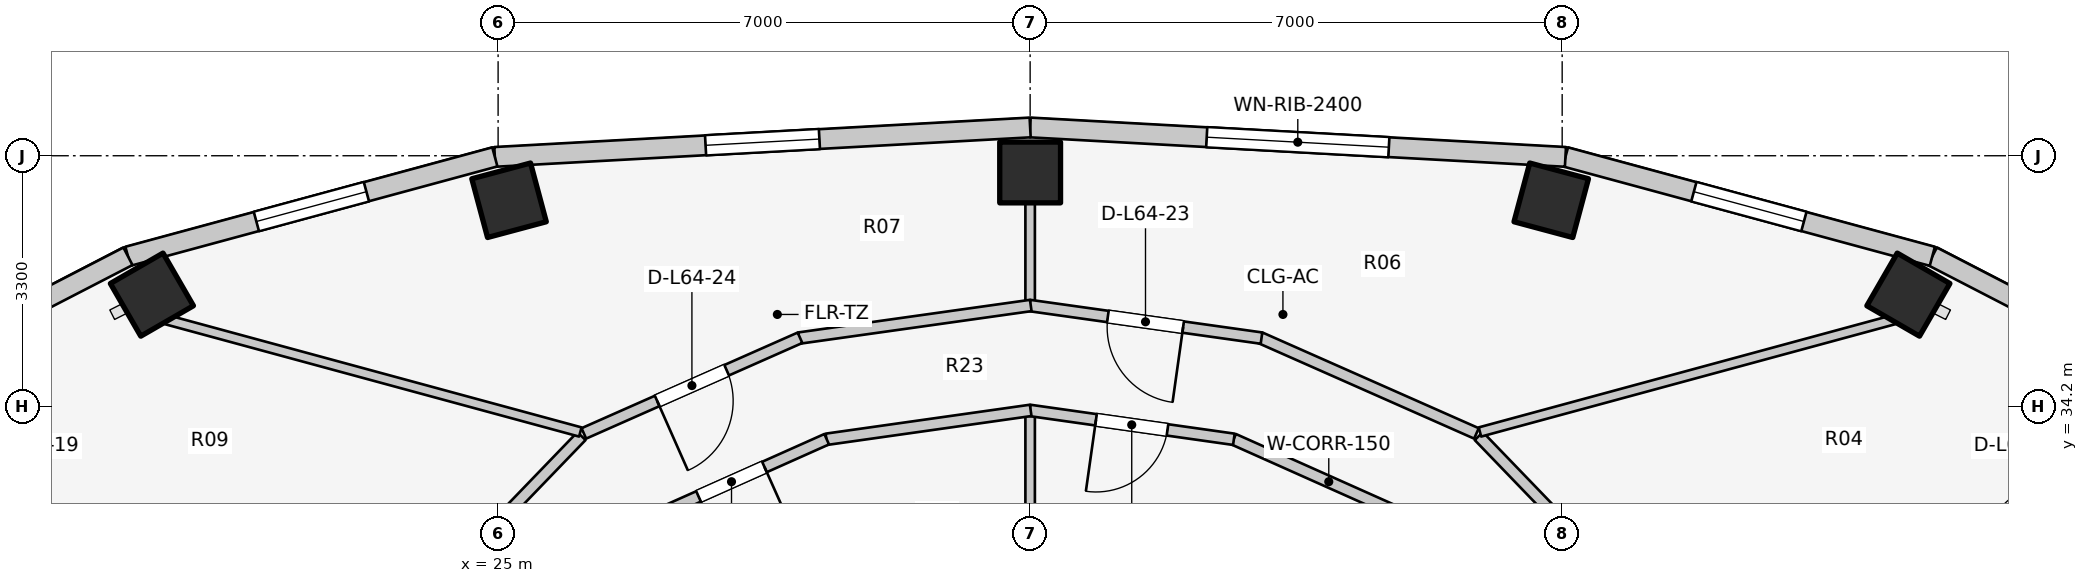
"""IFC4 building model, lengths in metres.
Left out: names, types, materials, properties, quantities, classifications, styles, units other than length and angle.
Written with IfcOpenShell. Run it as: python <this file> out.ifc"""

import sys

from ifc_helpers import new_model, si_unit, direction, frame, frame_2d, origin, origin_2d, place, context, subcontext, project, spatial, rectangle, extrude, element, fill, save


model = new_model("IFC4")
c1 = context("Model", 3, precision=1e-05, world=origin(), true_north=direction((0.0, 1.0)))
c2 = subcontext(c1, "Body", "Model", "MODEL_VIEW")
j1 = project(units=[si_unit("LENGTHUNIT", "METRE"), si_unit("PLANEANGLEUNIT", "RADIAN")], contexts=[c1])
p1 = place(None, origin())
s1 = spatial("IfcSite", under=j1, at=p1, CompositionType="ELEMENT")
p2 = place(p1, origin())
s2 = spatial("IfcBuilding", under=s1, at=p2, CompositionType="ELEMENT")
p3 = place(p2, frame((0.0, 0.0, 210.9)))
s3 = spatial("IfcBuildingStorey", under=s2, at=p3, CompositionType="ELEMENT", Elevation=210.9)
for number, where, z_axis, x_axis in (
    (1, (43.555, 35.673, 0.0), (0.0, 0.0, 1.0), (0.5, 0.866, 0.0)),
    (2, (38.856, 36.914, 0.0), (0.0, 0.0, 1.0), (0.259, 0.966, 0.0)),
    (3, (32.0, 37.28, 0.0), (0.0, 0.0, 1.0), (0.0, 1.0, 0.0)),
    (4, (25.144, 36.914, 0.0), (0.0, 0.0, 1.0), (-0.259, 0.966, 0.0)),
    (5, (20.445, 35.673, 0.0), (0.0, 0.0, 1.0), (-0.5, 0.866, 0.0)),
):
    element("IfcColumn", number, at=place(p3, frame(where, z_axis=z_axis, x_axis=x_axis)), inside=s3, PredefinedType="COLUMN", context=c2, shape_type="SweptSolid", body=[
        extrude(rectangle(XDim=0.8, YDim=0.8, at=origin_2d()), origin(), (0.0, 0.0, 1.0), 3.1),
    ])
p4 = place(p3, frame((47.558, 34.272, 0.0), z_axis=(0.0, 0.0, 1.0), x_axis=(-0.88849146803, 0.458893137057, 0.0)))
e6 = element("IfcWall", 6, at=p4, inside=s3, PredefinedType="STANDARD", context=c2, shape_type="SweptSolid", body=[
    extrude(rectangle(XDim=4.15, YDim=0.26, at=frame_2d((2.075, 0.0))), origin(), (0.0, 0.0, 1.0), 2.85),
])
p5 = place(p3, frame((43.87, 36.177, 0.0), z_axis=(0.0, 0.0, 1.0), x_axis=(-0.965213026382, 0.261464746576, 0.0)))
e7 = element("IfcWall", 7, at=p5, inside=s3, PredefinedType="STANDARD", context=c2, shape_type="SweptSolid", body=[
    extrude(rectangle(XDim=5.001, YDim=0.26, at=frame_2d((2.5, 0.0))), origin(), (0.0, 0.0, 1.0), 2.85),
])
p6 = place(p5, frame((1.75, 0.0, 0.75)))
e8 = element("IfcOpeningElement", 8, at=p6, cuts=e7, PredefinedType="OPENING", context=c2, shape_type="SweptSolid", body=[
    extrude(rectangle(XDim=1.5, YDim=1.6, at=frame_2d((0.75, 0.8))), frame((0.0, 0.14, 0.0), z_axis=(0.0, -1.0, 0.0), x_axis=(1.0, 0.0, 0.0)), (0.0, 0.0, 1.0), 0.28),
])
p7 = place(p3, frame((39.043, 37.485, 0.0), z_axis=(0.0, 0.0, 1.0), x_axis=(-0.998490239527, 0.054929423535, 0.0)))
e9 = element("IfcWall", 9, at=p7, inside=s3, PredefinedType="STANDARD", context=c2, shape_type="SweptSolid", body=[
    extrude(rectangle(XDim=7.054, YDim=0.26, at=frame_2d((3.527, 0.0))), origin(), (0.0, 0.0, 1.0), 2.85),
])
p8 = place(p7, frame((2.327, 0.0, 0.75)))
e10 = element("IfcOpeningElement", 10, at=p8, cuts=e9, PredefinedType="OPENING", context=c2, shape_type="SweptSolid", body=[
    extrude(rectangle(XDim=2.4, YDim=1.7, at=frame_2d((1.2, 0.85))), frame((0.0, 0.14, 0.0), z_axis=(0.0, -1.0, 0.0), x_axis=(1.0, 0.0, 0.0)), (0.0, 0.0, 1.0), 0.28),
])
p9 = place(p3, frame((32.0, 37.872, 0.0), z_axis=(0.0, 0.0, 1.0), x_axis=(-0.998490239527, -0.054929423535, 0.0)))
e11 = element("IfcWall", 11, at=p9, inside=s3, PredefinedType="STANDARD", context=c2, shape_type="SweptSolid", body=[
    extrude(rectangle(XDim=7.054, YDim=0.26, at=frame_2d((3.527, 0.0))), origin(), (0.0, 0.0, 1.0), 2.85),
])
p10 = place(p9, frame((2.777, 0.0, 0.75)))
e12 = element("IfcOpeningElement", 12, at=p10, cuts=e11, PredefinedType="OPENING", context=c2, shape_type="SweptSolid", body=[
    extrude(rectangle(XDim=1.5, YDim=1.6, at=frame_2d((0.75, 0.8))), frame((0.0, 0.14, 0.0), z_axis=(0.0, -1.0, 0.0), x_axis=(1.0, 0.0, 0.0)), (0.0, 0.0, 1.0), 0.28),
])
p11 = place(p3, frame((24.957, 37.485, 0.0), z_axis=(0.0, 0.0, 1.0), x_axis=(-0.965213026382, -0.261464746576, 0.0)))
e13 = element("IfcWall", 13, at=p11, inside=s3, PredefinedType="STANDARD", context=c2, shape_type="SweptSolid", body=[
    extrude(rectangle(XDim=5.001, YDim=0.26, at=frame_2d((2.5, 0.0))), origin(), (0.0, 0.0, 1.0), 2.85),
])
p12 = place(p11, frame((1.75, 0.0, 0.75)))
e14 = element("IfcOpeningElement", 14, at=p12, cuts=e13, PredefinedType="OPENING", context=c2, shape_type="SweptSolid", body=[
    extrude(rectangle(XDim=1.5, YDim=1.6, at=frame_2d((0.75, 0.8))), frame((0.0, 0.14, 0.0), z_axis=(0.0, -1.0, 0.0), x_axis=(1.0, 0.0, 0.0)), (0.0, 0.0, 1.0), 0.28),
])
p13 = place(p3, frame((20.13, 36.177, 0.0), z_axis=(0.0, 0.0, 1.0), x_axis=(-0.88849146803, -0.458893137057, 0.0)))
e15 = element("IfcWall", 15, at=p13, inside=s3, PredefinedType="STANDARD", context=c2, shape_type="SweptSolid", body=[
    extrude(rectangle(XDim=4.15, YDim=0.26, at=frame_2d((2.075, 0.0))), origin(), (0.0, 0.0, 1.0), 2.85),
])
p14 = place(p3, frame((32.0, 31.1, 0.0), z_axis=(0.0, 0.0, 1.0), x_axis=(0.0, 1.0, 0.0)))
e16 = element("IfcWall", 16, at=p14, inside=s3, PredefinedType="PARTITIONING", context=c2, shape_type="SweptSolid", body=[
    extrude(rectangle(XDim=3.05, YDim=0.125, at=frame_2d((1.525, 0.0))), origin(), (0.0, 0.0, 1.0), 2.376),
])
p15 = place(p3, frame((37.181, 32.652, 0.0), z_axis=(0.0, 0.0, 1.0), x_axis=(-0.913120130558, 0.407690602257, 0.0)))
e17 = element("IfcWall", 17, at=p15, inside=s3, PredefinedType="PARTITIONING", context=c2, shape_type="SweptSolid", body=[
    extrude(rectangle(XDim=2.743, YDim=0.15, at=frame_2d((1.371, 0.0))), origin(), (0.0, 0.0, 1.0), 2.376),
])
p16 = place(p3, frame((34.68, 33.77, 0.0), z_axis=(0.0, 0.0, 1.0), x_axis=(-0.990132151456, 0.140136799779, 0.0)))
e18 = element("IfcWall", 18, at=p16, inside=s3, PredefinedType="PARTITIONING", context=c2, shape_type="SweptSolid", body=[
    extrude(rectangle(XDim=2.714, YDim=0.15, at=frame_2d((1.357, 0.0))), origin(), (0.0, 0.0, 1.0), 2.376),
])
p17 = place(p16, frame((0.882, 0.0, 0.0)))
e19 = element("IfcOpeningElement", 19, at=p17, cuts=e18, PredefinedType="OPENING", context=c2, shape_type="SweptSolid", body=[
    extrude(rectangle(XDim=0.95, YDim=2.1, at=frame_2d((0.475, 1.05))), frame((0.0, 0.085, 0.0), z_axis=(0.0, -1.0, 0.0), x_axis=(1.0, 0.0, 0.0)), (0.0, 0.0, 1.0), 0.17),
])
p18 = place(p3, frame((32.007, 34.15, 0.0), z_axis=(0.0, 0.0, 1.0), x_axis=(-0.990132151456, -0.140136799779, 0.0)))
e20 = element("IfcWall", 20, at=p18, inside=s3, PredefinedType="PARTITIONING", context=c2, shape_type="SweptSolid", body=[
    extrude(rectangle(XDim=2.714, YDim=0.15, at=frame_2d((1.357, 0.0))), origin(), (0.0, 0.0, 1.0), 2.376),
])
p19 = place(p3, frame((29.323, 33.771, 0.0), z_axis=(0.0, 0.0, 1.0), x_axis=(-0.913120130558, -0.407690602257, 0.0)))
e21 = element("IfcWall", 21, at=p19, inside=s3, PredefinedType="PARTITIONING", context=c2, shape_type="SweptSolid", body=[
    extrude(rectangle(XDim=2.743, YDim=0.15, at=frame_2d((1.371, 0.0))), origin(), (0.0, 0.0, 1.0), 2.376),
])
p20 = place(p19, frame((0.896, 0.0, 0.0)))
e22 = element("IfcOpeningElement", 22, at=p20, cuts=e21, PredefinedType="OPENING", context=c2, shape_type="SweptSolid", body=[
    extrude(rectangle(XDim=0.95, YDim=2.1, at=frame_2d((0.475, 1.05))), frame((0.0, 0.085, 0.0), z_axis=(0.0, -1.0, 0.0), x_axis=(1.0, 0.0, 0.0)), (0.0, 0.0, 1.0), 0.17),
])
for number, where, z_axis, x_axis in (
    (23, (37.903, 33.812, 0.0), (0.0, 0.0, 1.0), (0.694, -0.72, 0.0)),
    (24, (26.097, 33.812, 0.0), (0.0, 0.0, 1.0), (-0.694, -0.72, 0.0)),
):
    element("IfcWall", number, at=place(p3, frame(where, z_axis=z_axis, x_axis=x_axis)), inside=s3, PredefinedType="PARTITIONING", context=c2, shape_type="SweptSolid", body=[
        extrude(rectangle(XDim=2.158, YDim=0.15, at=frame_2d((1.079, 0.0))), origin(), (0.0, 0.0, 1.0), 2.376),
    ])
p21 = place(p3, frame((37.918, 33.866, 0.0), z_axis=(0.0, 0.0, 1.0), x_axis=(0.965109390289, 0.261847025523, 0.0)))
e25 = element("IfcWall", 25, at=p21, inside=s3, PredefinedType="PARTITIONING", context=c2, shape_type="SweptSolid", body=[
    extrude(rectangle(XDim=5.644, YDim=0.125, at=frame_2d((2.822, 0.0))), origin(), (0.0, 0.0, 1.0), 2.376),
])
p22 = place(p3, frame((32.0, 35.585, 0.0), z_axis=(0.0, 0.0, 1.0), x_axis=(0.0, 1.0, 0.0)))
e26 = element("IfcWall", 26, at=p22, inside=s3, PredefinedType="PARTITIONING", context=c2, shape_type="SweptSolid", body=[
    extrude(rectangle(XDim=1.315, YDim=0.125, at=frame_2d((0.657, 0.0))), origin(), (0.0, 0.0, 1.0), 2.376),
])
p23 = place(p3, frame((26.082, 33.866, 0.0), z_axis=(0.0, 0.0, 1.0), x_axis=(-0.965109390289, 0.261847025523, 0.0)))
e27 = element("IfcWall", 27, at=p23, inside=s3, PredefinedType="PARTITIONING", context=c2, shape_type="SweptSolid", body=[
    extrude(rectangle(XDim=5.644, YDim=0.125, at=frame_2d((2.822, 0.0))), origin(), (0.0, 0.0, 1.0), 2.376),
])
p24 = place(p3, frame((37.872, 33.847, 0.0), z_axis=(0.0, 0.0, 1.0), x_axis=(-0.914490094652, 0.40460828808, 0.0)))
e28 = element("IfcWall", 28, at=p24, inside=s3, PredefinedType="PARTITIONING", context=c2, shape_type="SweptSolid", body=[
    extrude(rectangle(XDim=3.11, YDim=0.15, at=frame_2d((1.555, 0.0))), origin(), (0.0, 0.0, 1.0), 2.376),
])
p25 = place(p3, frame((35.044, 35.101, 0.0), z_axis=(0.0, 0.0, 1.0), x_axis=(-0.990257602807, 0.139247549651, 0.0)))
e29 = element("IfcWall", 29, at=p25, inside=s3, PredefinedType="PARTITIONING", context=c2, shape_type="SweptSolid", body=[
    extrude(rectangle(XDim=3.082, YDim=0.15, at=frame_2d((1.541, 0.0))), origin(), (0.0, 0.0, 1.0), 2.376),
])
p26 = place(p25, frame((1.041, 0.0, 0.0)))
e30 = element("IfcOpeningElement", 30, at=p26, cuts=e29, PredefinedType="OPENING", context=c2, shape_type="SweptSolid", body=[
    extrude(rectangle(XDim=1.0, YDim=2.1, at=frame_2d((0.5, 1.05))), frame((0.0, 0.085, 0.0), z_axis=(0.0, -1.0, 0.0), x_axis=(1.0, 0.0, 0.0)), (0.0, 0.0, 1.0), 0.17),
])
p27 = place(p3, frame((32.008, 35.53, 0.0), z_axis=(0.0, 0.0, 1.0), x_axis=(-0.990257602807, -0.139247549651, 0.0)))
e31 = element("IfcWall", 31, at=p27, inside=s3, PredefinedType="PARTITIONING", context=c2, shape_type="SweptSolid", body=[
    extrude(rectangle(XDim=3.082, YDim=0.15, at=frame_2d((1.541, 0.0))), origin(), (0.0, 0.0, 1.0), 2.376),
])
p28 = place(p3, frame((28.972, 35.105, 0.0), z_axis=(0.0, 0.0, 1.0), x_axis=(-0.914490094652, -0.40460828808, 0.0)))
e32 = element("IfcWall", 32, at=p28, inside=s3, PredefinedType="PARTITIONING", context=c2, shape_type="SweptSolid", body=[
    extrude(rectangle(XDim=3.11, YDim=0.15, at=frame_2d((1.555, 0.0))), origin(), (0.0, 0.0, 1.0), 2.376),
])
p29 = place(p28, frame((1.055, 0.0, 0.0)))
e33 = element("IfcOpeningElement", 33, at=p29, cuts=e32, PredefinedType="OPENING", context=c2, shape_type="SweptSolid", body=[
    extrude(rectangle(XDim=1.0, YDim=2.1, at=frame_2d((0.5, 1.05))), frame((0.0, 0.085, 0.0), z_axis=(0.0, -1.0, 0.0), x_axis=(1.0, 0.0, 0.0)), (0.0, 0.0, 1.0), 0.17),
])
p30 = place(p6, origin())
e34 = element("IfcWindow", 34, at=p30, inside=s3, PartitioningType="SINGLE_PANEL", PredefinedType="WINDOW", context=c2, shape_type="SweptSolid", body=[
    extrude(rectangle(XDim=1.5, YDim=1.6, at=frame_2d((0.75, 0.8))), frame((0.0, 0.03, 0.0), z_axis=(0.0, -1.0, 0.0), x_axis=(1.0, 0.0, 0.0)), (0.0, 0.0, 1.0), 0.06),
])
fill(e8, e34)
p31 = place(p8, origin())
e35 = element("IfcWindow", 35, at=p31, inside=s3, PartitioningType="SINGLE_PANEL", PredefinedType="WINDOW", context=c2, shape_type="SweptSolid", body=[
    extrude(rectangle(XDim=2.4, YDim=1.7, at=frame_2d((1.2, 0.85))), frame((0.0, 0.03, 0.0), z_axis=(0.0, -1.0, 0.0), x_axis=(1.0, 0.0, 0.0)), (0.0, 0.0, 1.0), 0.06),
])
fill(e10, e35)
p32 = place(p10, origin())
e36 = element("IfcWindow", 36, at=p32, inside=s3, PartitioningType="SINGLE_PANEL", PredefinedType="WINDOW", context=c2, shape_type="SweptSolid", body=[
    extrude(rectangle(XDim=1.5, YDim=1.6, at=frame_2d((0.75, 0.8))), frame((0.0, 0.03, 0.0), z_axis=(0.0, -1.0, 0.0), x_axis=(1.0, 0.0, 0.0)), (0.0, 0.0, 1.0), 0.06),
])
fill(e12, e36)
p33 = place(p12, origin())
e37 = element("IfcWindow", 37, at=p33, inside=s3, PartitioningType="SINGLE_PANEL", PredefinedType="WINDOW", context=c2, shape_type="SweptSolid", body=[
    extrude(rectangle(XDim=1.5, YDim=1.6, at=frame_2d((0.75, 0.8))), frame((0.0, 0.03, 0.0), z_axis=(0.0, -1.0, 0.0), x_axis=(1.0, 0.0, 0.0)), (0.0, 0.0, 1.0), 0.06),
])
fill(e14, e37)
p34 = place(p17, origin())
e38 = element("IfcDoor", 38, at=p34, inside=s3, OperationType="SINGLE_SWING_RIGHT", PredefinedType="DOOR", context=c2, shape_type="SweptSolid", body=[
    extrude(rectangle(XDim=0.95, YDim=2.1, at=frame_2d((0.475, 1.05))), frame((0.0, 0.025, 0.0), z_axis=(0.0, -1.0, 0.0), x_axis=(1.0, 0.0, 0.0)), (0.0, 0.0, 1.0), 0.05),
])
fill(e19, e38)
p35 = place(p20, origin())
e39 = element("IfcDoor", 39, at=p35, inside=s3, OperationType="SINGLE_SWING_LEFT", PredefinedType="DOOR", context=c2, shape_type="SweptSolid", body=[
    extrude(rectangle(XDim=0.95, YDim=2.1, at=frame_2d((0.475, 1.05))), frame((0.0, 0.025, 0.0), z_axis=(0.0, -1.0, 0.0), x_axis=(1.0, 0.0, 0.0)), (0.0, 0.0, 1.0), 0.05),
])
fill(e22, e39)
p36 = place(p26, origin())
e40 = element("IfcDoor", 40, at=p36, inside=s3, OperationType="SINGLE_SWING_LEFT", PredefinedType="DOOR", context=c2, shape_type="SweptSolid", body=[
    extrude(rectangle(XDim=1.0, YDim=2.1, at=frame_2d((0.5, 1.05))), frame((0.0, 0.025, 0.0), z_axis=(0.0, -1.0, 0.0), x_axis=(1.0, 0.0, 0.0)), (0.0, 0.0, 1.0), 0.05),
])
fill(e30, e40)
p37 = place(p29, origin())
e41 = element("IfcDoor", 41, at=p37, inside=s3, OperationType="SINGLE_SWING_RIGHT", PredefinedType="DOOR", context=c2, shape_type="SweptSolid", body=[
    extrude(rectangle(XDim=1.0, YDim=2.1, at=frame_2d((0.5, 1.05))), frame((0.0, 0.025, 0.0), z_axis=(0.0, -1.0, 0.0), x_axis=(1.0, 0.0, 0.0)), (0.0, 0.0, 1.0), 0.05),
])
fill(e33, e41)
save(model, sys.argv[1])
